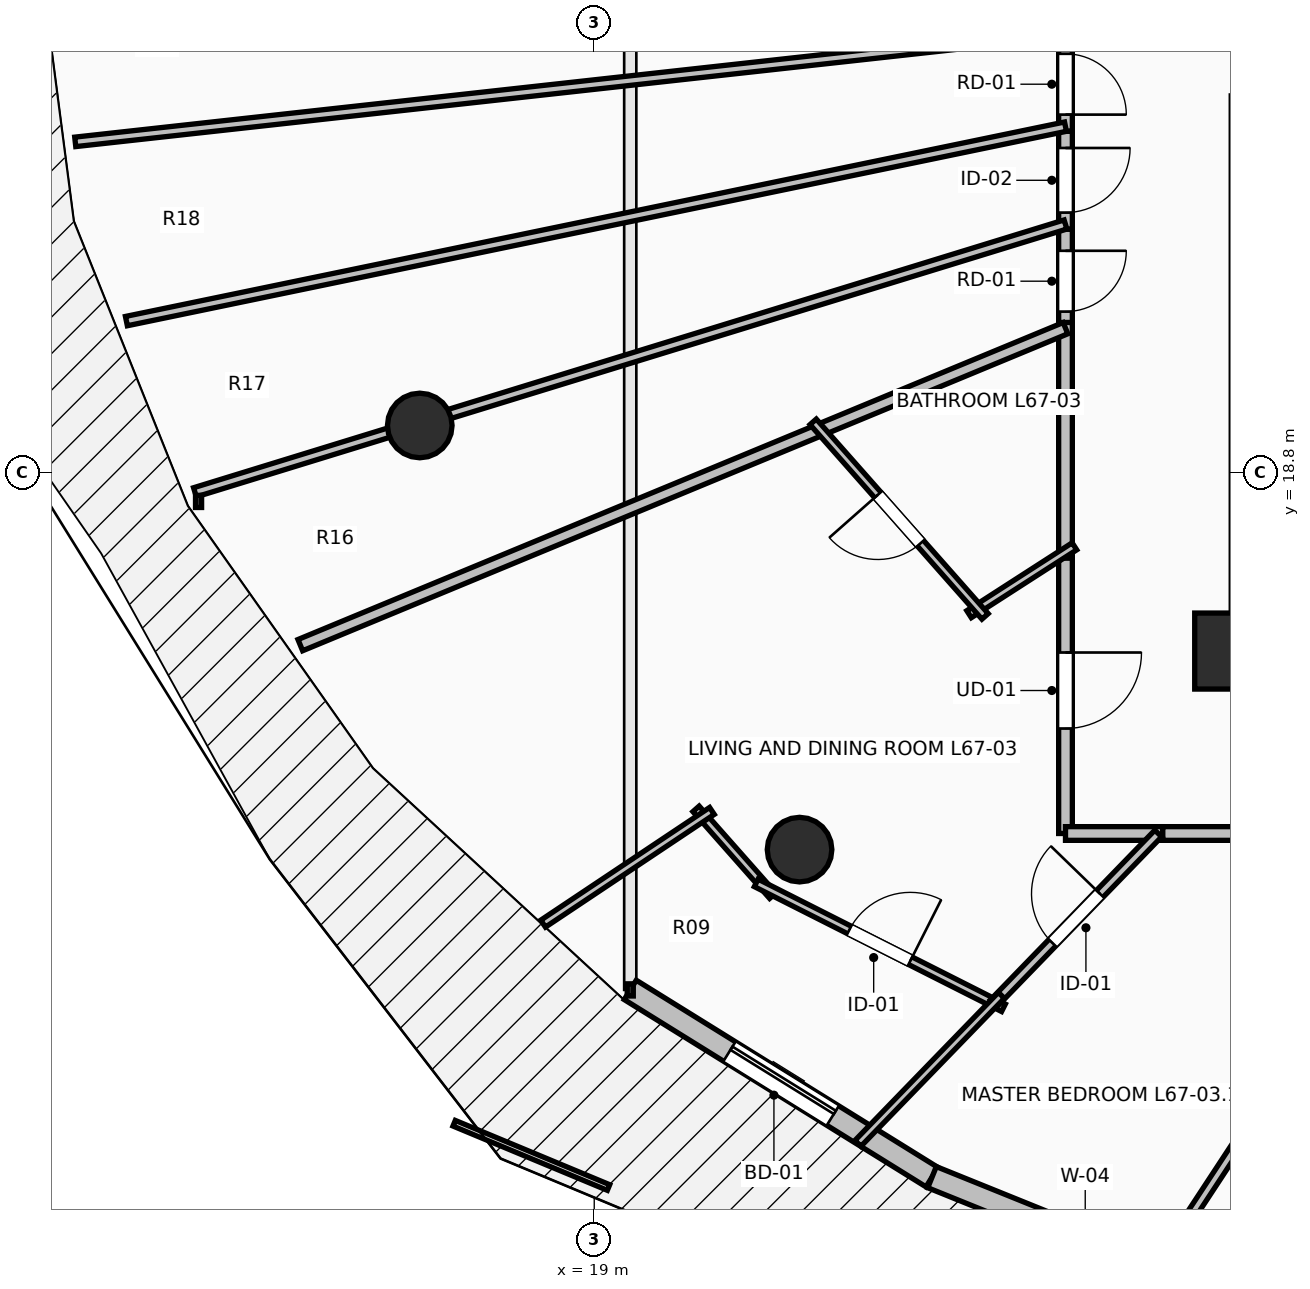
"""IFC4 building model, lengths in metres.
Left out: names, types, materials, properties, quantities, classifications, styles, units other than length and angle.
Written with IfcOpenShell. Run it as: python <this file> out.ifc"""

import sys

from ifc_helpers import new_model, si_unit, direction, frame, frame_2d, origin, origin_2d, place, context, subcontext, project, spatial, rectangle, circle, extrude, element, fill, save


model = new_model("IFC4")
c1 = context("Model", 3, precision=1e-05, world=origin(), true_north=direction((0.0, 1.0)))
c2 = subcontext(c1, "Body", "Model", "MODEL_VIEW")
j1 = project(units=[si_unit("LENGTHUNIT", "METRE"), si_unit("PLANEANGLEUNIT", "RADIAN")], contexts=[c1])
p1 = place(None, origin())
s1 = spatial("IfcSite", under=j1, at=p1, CompositionType="ELEMENT")
p2 = place(p1, origin())
s2 = spatial("IfcBuilding", under=s1, at=p2, CompositionType="ELEMENT")
p3 = place(p2, frame((0.0, 0.0, 248.45)))
s3 = spatial("IfcBuildingStorey", under=s2, at=p3, CompositionType="ELEMENT", Elevation=248.45)
for number, where, z_axis, x_axis in (
    (1, (16.705, 19.418, 0.0), (0.0, 0.0, 1.0), (-0.924, -0.383, 0.0)),
    (2, (21.701, 13.838, 0.0), (0.0, 0.0, 1.0), (-0.707, -0.707, 0.0)),
):
    element("IfcColumn", number, at=place(p3, frame(where, z_axis=z_axis, x_axis=x_axis)), inside=s3, PredefinedType="COLUMN", context=c2, shape_type="SweptSolid", body=[
        extrude(circle(Radius=0.425, at=origin_2d()), origin(), (0.0, 0.0, 1.0), 3.55),
    ])
p4 = place(p3, frame((27.25, 16.45, 0.0), z_axis=(0.0, 0.0, 1.0), x_axis=(1.0, 0.0, 0.0)))
e3 = element("IfcColumn", 3, at=p4, inside=s3, PredefinedType="PILASTER", context=c2, shape_type="SweptSolid", body=[
    extrude(rectangle(XDim=0.7, YDim=1.0, at=origin_2d()), origin(), (0.0, 0.0, 1.0), 3.55),
])
p5 = place(p3, frame((19.474, 11.992, 0.0), z_axis=(0.0, 0.0, 1.0), x_axis=(0.849702323036, -0.527262707032, 0.0)))
e4 = element("IfcWall", 4, at=p5, inside=s3, PredefinedType="STANDARD", context=c2, shape_type="SweptSolid", body=[
    extrude(rectangle(XDim=4.672, YDim=0.3, at=frame_2d((2.336, 0.0))), origin(), (0.0, 0.0, 1.0), 3.29),
])
p6 = place(p5, frame((1.536, 0.0, 0.0)))
e5 = element("IfcOpeningElement", 5, at=p6, cuts=e4, PredefinedType="OPENING", context=c2, shape_type="SweptSolid", body=[
    extrude(rectangle(XDim=1.6, YDim=2.3, at=frame_2d((0.8, 1.15))), frame((0.0, 0.165, 0.0), z_axis=(0.0, -1.0, 0.0), x_axis=(1.0, 0.0, 0.0)), (0.0, 0.0, 1.0), 0.33),
])
p7 = place(p3, frame((23.444, 9.529, 0.0), z_axis=(0.0, 0.0, 1.0), x_axis=(0.927147375511, -0.374696869594, 0.0)))
e6 = element("IfcWall", 6, at=p7, inside=s3, PredefinedType="STANDARD", context=c2, shape_type="SweptSolid", body=[
    extrude(rectangle(XDim=4.885, YDim=0.3, at=frame_2d((2.443, 0.0))), origin(), (0.0, 0.0, 1.0), 3.29),
])
p8 = place(p7, frame((1.574, 0.0, 0.85)))
e7 = element("IfcOpeningElement", 7, at=p8, cuts=e6, PredefinedType="OPENING", context=c2, shape_type="SweptSolid", body=[
    extrude(rectangle(XDim=1.2, YDim=1.95, at=frame_2d((0.6, 0.975))), frame((0.0, 0.165, 0.0), z_axis=(0.0, -1.0, 0.0), x_axis=(1.0, 0.0, 0.0)), (0.0, 0.0, 1.0), 0.33),
])
p9 = place(p7, frame((3.606, 0.0, 0.85)))
e8 = element("IfcOpeningElement", 8, at=p9, cuts=e6, PredefinedType="OPENING", context=c2, shape_type="SweptSolid", body=[
    extrude(rectangle(XDim=0.9, YDim=1.8, at=frame_2d((0.45, 0.9))), frame((0.0, 0.165, 0.0), z_axis=(0.0, -1.0, 0.0), x_axis=(1.0, 0.0, 0.0)), (0.0, 0.0, 1.0), 0.33),
])
p10 = place(p3, frame((25.2, 24.527, 0.0), z_axis=(0.0, 0.0, 1.0), x_axis=(0.0, -1.0, 0.0)))
e9 = element("IfcWall", 9, at=p10, inside=s3, PredefinedType="PARTITIONING", context=c2, shape_type="SweptSolid", body=[
    extrude(rectangle(XDim=1.239, YDim=0.18, at=frame_2d((0.62, 0.0))), origin(), (0.0, 0.0, 1.0), 3.29),
])
p11 = place(p10, frame((0.219, 0.0, 0.0)))
e10 = element("IfcOpeningElement", 10, at=p11, cuts=e9, PredefinedType="OPENING", context=c2, shape_type="SweptSolid", body=[
    extrude(rectangle(XDim=0.8, YDim=2.05, at=frame_2d((0.4, 1.025))), frame((0.0, 0.105, 0.0), z_axis=(0.0, -1.0, 0.0), x_axis=(1.0, 0.0, 0.0)), (0.0, 0.0, 1.0), 0.21),
])
p12 = place(p3, frame((25.2, 23.288, 0.0), z_axis=(0.0, 0.0, 1.0), x_axis=(0.0, -1.0, 0.0)))
e11 = element("IfcWall", 11, at=p12, inside=s3, PredefinedType="PARTITIONING", context=c2, shape_type="SweptSolid", body=[
    extrude(rectangle(XDim=1.289, YDim=0.18, at=frame_2d((0.645, 0.0))), origin(), (0.0, 0.0, 1.0), 3.29),
])
p13 = place(p12, frame((0.219, 0.0, 0.0)))
e12 = element("IfcOpeningElement", 12, at=p13, cuts=e11, PredefinedType="OPENING", context=c2, shape_type="SweptSolid", body=[
    extrude(rectangle(XDim=0.85, YDim=2.1, at=frame_2d((0.425, 1.05))), frame((0.0, 0.105, 0.0), z_axis=(0.0, -1.0, 0.0), x_axis=(1.0, 0.0, 0.0)), (0.0, 0.0, 1.0), 0.21),
])
p14 = place(p3, frame((25.2, 21.999, 0.0), z_axis=(0.0, 0.0, 1.0), x_axis=(0.0, -1.0, 0.0)))
e13 = element("IfcWall", 13, at=p14, inside=s3, PredefinedType="PARTITIONING", context=c2, shape_type="SweptSolid", body=[
    extrude(rectangle(XDim=1.366, YDim=0.18, at=frame_2d((0.683, 0.0))), origin(), (0.0, 0.0, 1.0), 3.29),
])
p15 = place(p14, frame((0.283, 0.0, 0.0)))
e14 = element("IfcOpeningElement", 14, at=p15, cuts=e13, PredefinedType="OPENING", context=c2, shape_type="SweptSolid", body=[
    extrude(rectangle(XDim=0.8, YDim=2.05, at=frame_2d((0.4, 1.025))), frame((0.0, 0.105, 0.0), z_axis=(0.0, -1.0, 0.0), x_axis=(1.0, 0.0, 0.0)), (0.0, 0.0, 1.0), 0.21),
])
p16 = place(p3, frame((25.2, 17.812, 0.0), z_axis=(0.0, 0.0, 1.0), x_axis=(0.0, -1.0, 0.0)))
e15 = element("IfcWall", 15, at=p16, inside=s3, PredefinedType="PARTITIONING", context=c2, shape_type="SweptSolid", body=[
    extrude(rectangle(XDim=3.762, YDim=0.18, at=frame_2d((1.881, 0.0))), origin(), (0.0, 0.0, 1.0), 2.482),
])
p17 = place(p16, frame((1.381, 0.0, 0.0)))
e16 = element("IfcOpeningElement", 16, at=p17, cuts=e15, PredefinedType="OPENING", context=c2, shape_type="SweptSolid", body=[
    extrude(rectangle(XDim=1.0, YDim=2.15, at=frame_2d((0.5, 1.075))), frame((0.0, 0.105, 0.0), z_axis=(0.0, -1.0, 0.0), x_axis=(1.0, 0.0, 0.0)), (0.0, 0.0, 1.0), 0.21),
])
p18 = place(p3, frame((25.2, 14.05, 0.0), z_axis=(0.0, 0.0, 1.0), x_axis=(1.0, 0.0, 0.0)))
e17 = element("IfcWall", 17, at=p18, inside=s3, PredefinedType="PARTITIONING", context=c2, shape_type="SweptSolid", body=[
    extrude(rectangle(XDim=1.28, YDim=0.18, at=frame_2d((0.64, 0.0))), origin(), (0.0, 0.0, 1.0), 2.972),
])
p19 = place(p3, frame((25.2, 20.773, 0.0), z_axis=(0.0, 0.0, 1.0), x_axis=(0.0, -1.0, 0.0)))
e18 = element("IfcWall", 18, at=p19, inside=s3, PredefinedType="PARTITIONING", context=c2, shape_type="SweptSolid", body=[
    extrude(rectangle(XDim=3.101, YDim=0.18, at=frame_2d((1.55, 0.0))), origin(), (0.0, 0.0, 1.0), 3.29),
])
p20 = place(p3, frame((26.48, 14.05, 0.0), z_axis=(0.0, 0.0, 1.0), x_axis=(1.0, 0.0, 0.0)))
e19 = element("IfcWall", 19, at=p20, inside=s3, PredefinedType="PARTITIONING", context=c2, shape_type="SweptSolid", body=[
    extrude(rectangle(XDim=3.73, YDim=0.18, at=frame_2d((1.865, 0.0))), origin(), (0.0, 0.0, 1.0), 2.482),
])
p21 = place(p3, frame((12.172, 23.149, 0.0), z_axis=(0.0, 0.0, 1.0), x_axis=(0.993963433103, 0.109711866515, 0.0)))
e20 = element("IfcWall", 20, at=p21, inside=s3, PredefinedType="PARTITIONING", context=c2, shape_type="SweptSolid", body=[
    extrude(rectangle(XDim=13.107, YDim=0.125, at=frame_2d((6.553, 0.0))), origin(), (0.0, 0.0, 1.0), 2.874),
])
p22 = place(p3, frame((12.845, 20.791, 0.0), z_axis=(0.0, 0.0, 1.0), x_axis=(0.97923049011, 0.202750208975, 0.0)))
e21 = element("IfcWall", 21, at=p22, inside=s3, PredefinedType="PARTITIONING", context=c2, shape_type="SweptSolid", body=[
    extrude(rectangle(XDim=12.617, YDim=0.125, at=frame_2d((6.309, 0.0))), origin(), (0.0, 0.0, 1.0), 2.874),
])
p23 = place(p3, frame((13.747, 18.539, 0.0), z_axis=(0.0, 0.0, 1.0), x_axis=(0.955802794564, 0.294008533725, 0.0)))
e22 = element("IfcWall", 22, at=p23, inside=s3, PredefinedType="PARTITIONING", context=c2, shape_type="SweptSolid", body=[
    extrude(rectangle(XDim=11.982, YDim=0.125, at=frame_2d((5.991, 0.0))), origin(), (0.0, 0.0, 1.0), 2.482),
])
p24 = place(p3, frame((15.133, 16.528, 0.0), z_axis=(0.0, 0.0, 1.0), x_axis=(0.923877013663, 0.382689513347, 0.0)))
e23 = element("IfcWall", 23, at=p24, inside=s3, PredefinedType="PARTITIONING", context=c2, shape_type="SweptSolid", body=[
    extrude(rectangle(XDim=10.896, YDim=0.16, at=frame_2d((5.448, 0.0))), origin(), (0.0, 0.0, 1.0), 2.482),
])
p25 = place(p3, frame((25.318, 17.828, 0.0), z_axis=(0.0, 0.0, 1.0), x_axis=(-0.840783734709, -0.541371140207, 0.0)))
e24 = element("IfcWall", 24, at=p25, inside=s3, PredefinedType="PARTITIONING", context=c2, shape_type="SweptSolid", body=[
    extrude(rectangle(XDim=1.649, YDim=0.11, at=frame_2d((0.824, 0.0))), origin(), (0.0, 0.0, 1.0), 2.482),
])
p26 = place(p3, frame((24.142, 16.906, 0.0), z_axis=(0.0, 0.0, 1.0), x_axis=(-0.662044708061, 0.749464345068, 0.0)))
e25 = element("IfcWall", 25, at=p26, inside=s3, PredefinedType="PARTITIONING", context=c2, shape_type="SweptSolid", body=[
    extrude(rectangle(XDim=3.416, YDim=0.11, at=frame_2d((1.708, 0.0))), origin(), (0.0, 0.0, 1.0), 2.482),
])
p27 = place(p26, frame((1.283, 0.0, 0.0)))
e26 = element("IfcOpeningElement", 26, at=p27, cuts=e25, PredefinedType="OPENING", context=c2, shape_type="SweptSolid", body=[
    extrude(rectangle(XDim=0.85, YDim=2.1, at=frame_2d((0.425, 1.05))), frame((0.0, 0.07, 0.0), z_axis=(0.0, -1.0, 0.0), x_axis=(1.0, 0.0, 0.0)), (0.0, 0.0, 1.0), 0.14),
])
p28 = place(p3, frame((20.339, 14.374, 0.0), z_axis=(0.0, 0.0, 1.0), x_axis=(0.662352602393, -0.749192251764, 0.0)))
e27 = element("IfcWall", 27, at=p28, inside=s3, PredefinedType="PARTITIONING", context=c2, shape_type="SweptSolid", body=[
    extrude(rectangle(XDim=1.524, YDim=0.11, at=frame_2d((0.762, 0.0))), origin(), (0.0, 0.0, 1.0), 3.29),
])
p29 = place(p3, frame((21.131, 13.4, 0.0), z_axis=(0.0, 0.0, 1.0), x_axis=(0.892570631547, -0.450907604394, 0.0)))
e28 = element("IfcWall", 28, at=p29, inside=s3, PredefinedType="PARTITIONING", context=c2, shape_type="SweptSolid", body=[
    extrude(rectangle(XDim=3.645, YDim=0.11, at=frame_2d((1.822, 0.0))), origin(), (0.0, 0.0, 1.0), 3.29),
])
p30 = place(p29, frame((1.372, 0.0, 0.0)))
e29 = element("IfcOpeningElement", 29, at=p30, cuts=e28, PredefinedType="OPENING", context=c2, shape_type="SweptSolid", body=[
    extrude(rectangle(XDim=0.9, YDim=2.1, at=frame_2d((0.45, 1.05))), frame((0.0, 0.07, 0.0), z_axis=(0.0, -1.0, 0.0), x_axis=(1.0, 0.0, 0.0)), (0.0, 0.0, 1.0), 0.14),
])
p31 = place(p3, frame((18.328, 12.864, 0.0), z_axis=(0.0, 0.0, 1.0), x_axis=(0.831712526046, 0.555206514748, 0.0)))
e30 = element("IfcWall", 30, at=p31, inside=s3, PredefinedType="PARTITIONING", context=c2, shape_type="SweptSolid", body=[
    extrude(rectangle(XDim=2.67, YDim=0.11, at=frame_2d((1.335, 0.0))), origin(), (0.0, 0.0, 1.0), 3.29),
])
p32 = place(p3, frame((24.259, 11.82, 0.0), z_axis=(0.0, 0.0, 1.0), x_axis=(0.695894072482, 0.718144442215, 0.0)))
e31 = element("IfcWall", 31, at=p32, inside=s3, PredefinedType="PARTITIONING", context=c2, shape_type="SweptSolid", body=[
    extrude(rectangle(XDim=3.105, YDim=0.125, at=frame_2d((1.553, 0.0))), origin(), (0.0, 0.0, 1.0), 2.874),
])
p33 = place(p32, frame((1.103, 0.0, 0.0)))
e32 = element("IfcOpeningElement", 32, at=p33, cuts=e31, PredefinedType="OPENING", context=c2, shape_type="SweptSolid", body=[
    extrude(rectangle(XDim=0.9, YDim=2.1, at=frame_2d((0.45, 1.05))), frame((0.0, 0.077, 0.0), z_axis=(0.0, -1.0, 0.0), x_axis=(1.0, 0.0, 0.0)), (0.0, 0.0, 1.0), 0.155),
])
p34 = place(p3, frame((22.469, 9.973, 0.0), z_axis=(0.0, 0.0, 1.0), x_axis=(0.695944713466, 0.718095366786, 0.0)))
e33 = element("IfcWall", 33, at=p34, inside=s3, PredefinedType="PARTITIONING", context=c2, shape_type="SweptSolid", body=[
    extrude(rectangle(XDim=2.711, YDim=0.11, at=frame_2d((1.356, 0.0))), origin(), (0.0, 0.0, 1.0), 3.29),
])
p35 = place(p3, frame((26.397, 8.336, 0.0), z_axis=(0.0, 0.0, 1.0), x_axis=(0.548967647923, 0.835843598728, 0.0)))
e34 = element("IfcWall", 34, at=p35, inside=s3, PredefinedType="PARTITIONING", context=c2, shape_type="SweptSolid", body=[
    extrude(rectangle(XDim=6.836, YDim=0.125, at=frame_2d((3.418, 0.0))), origin(), (0.0, 0.0, 1.0), 2.482),
])
p36 = place(p6, origin())
e35 = element("IfcDoor", 35, at=p36, inside=s3, OperationType="SLIDING_TO_LEFT", PredefinedType="DOOR", context=c2, shape_type="SweptSolid", body=[
    extrude(rectangle(XDim=1.6, YDim=2.3, at=frame_2d((0.8, 1.15))), frame((0.0, 0.025, 0.0), z_axis=(0.0, -1.0, 0.0), x_axis=(1.0, 0.0, 0.0)), (0.0, 0.0, 1.0), 0.05),
])
fill(e5, e35)
p37 = place(p17, origin())
e36 = element("IfcDoor", 36, at=p37, inside=s3, OperationType="SINGLE_SWING_LEFT", PredefinedType="DOOR", context=c2, shape_type="SweptSolid", body=[
    extrude(rectangle(XDim=1.0, YDim=2.15, at=frame_2d((0.5, 1.075))), frame((0.0, 0.025, 0.0), z_axis=(0.0, -1.0, 0.0), x_axis=(1.0, 0.0, 0.0)), (0.0, 0.0, 1.0), 0.05),
])
fill(e16, e36)
p38 = place(p27, origin())
e37 = element("IfcDoor", 37, at=p38, inside=s3, OperationType="SINGLE_SWING_RIGHT", PredefinedType="DOOR", context=c2, shape_type="SweptSolid", body=[
    extrude(rectangle(XDim=0.85, YDim=2.1, at=frame_2d((0.425, 1.05))), frame((0.0, 0.025, 0.0), z_axis=(0.0, -1.0, 0.0), x_axis=(1.0, 0.0, 0.0)), (0.0, 0.0, 1.0), 0.05),
])
fill(e26, e37)
p39 = place(p30, origin())
e38 = element("IfcDoor", 38, at=p39, inside=s3, OperationType="SINGLE_SWING_RIGHT", PredefinedType="DOOR", context=c2, shape_type="SweptSolid", body=[
    extrude(rectangle(XDim=0.9, YDim=2.1, at=frame_2d((0.45, 1.05))), frame((0.0, 0.025, 0.0), z_axis=(0.0, -1.0, 0.0), x_axis=(1.0, 0.0, 0.0)), (0.0, 0.0, 1.0), 0.05),
])
fill(e29, e38)
p40 = place(p33, origin())
e39 = element("IfcDoor", 39, at=p40, inside=s3, OperationType="SINGLE_SWING_RIGHT", PredefinedType="DOOR", context=c2, shape_type="SweptSolid", body=[
    extrude(rectangle(XDim=0.9, YDim=2.1, at=frame_2d((0.45, 1.05))), frame((0.0, 0.025, 0.0), z_axis=(0.0, -1.0, 0.0), x_axis=(1.0, 0.0, 0.0)), (0.0, 0.0, 1.0), 0.05),
])
fill(e32, e39)
p41 = place(p11, origin())
e40 = element("IfcDoor", 40, at=p41, inside=s3, OperationType="SINGLE_SWING_RIGHT", PredefinedType="DOOR", context=c2, shape_type="SweptSolid", body=[
    extrude(rectangle(XDim=0.8, YDim=2.05, at=frame_2d((0.4, 1.025))), frame((0.0, 0.025, 0.0), z_axis=(0.0, -1.0, 0.0), x_axis=(1.0, 0.0, 0.0)), (0.0, 0.0, 1.0), 0.05),
])
fill(e10, e40)
p42 = place(p13, origin())
e41 = element("IfcDoor", 41, at=p42, inside=s3, OperationType="SINGLE_SWING_LEFT", PredefinedType="DOOR", context=c2, shape_type="SweptSolid", body=[
    extrude(rectangle(XDim=0.85, YDim=2.1, at=frame_2d((0.425, 1.05))), frame((0.0, 0.025, 0.0), z_axis=(0.0, -1.0, 0.0), x_axis=(1.0, 0.0, 0.0)), (0.0, 0.0, 1.0), 0.05),
])
fill(e12, e41)
p43 = place(p15, origin())
e42 = element("IfcDoor", 42, at=p43, inside=s3, OperationType="SINGLE_SWING_LEFT", PredefinedType="DOOR", context=c2, shape_type="SweptSolid", body=[
    extrude(rectangle(XDim=0.8, YDim=2.05, at=frame_2d((0.4, 1.025))), frame((0.0, 0.025, 0.0), z_axis=(0.0, -1.0, 0.0), x_axis=(1.0, 0.0, 0.0)), (0.0, 0.0, 1.0), 0.05),
])
fill(e14, e42)
save(model, sys.argv[1])
